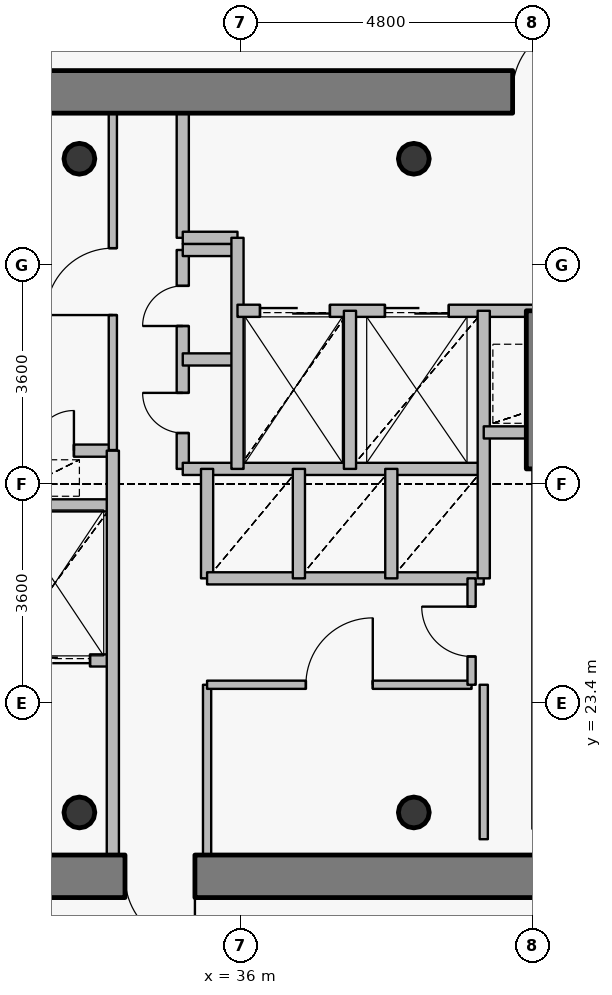
"""IFC4 building model, lengths in metres.
Left out: names, types, materials, properties, quantities, classifications, styles, units other than length and angle.
Written with IfcOpenShell. Run it as: python <this file> out.ifc"""

import sys

from ifc_helpers import new_model, si_unit, direction, frame, frame_2d, origin, origin_2d, place, context, subcontext, project, spatial, rectangle, hollow_circle, extrude, source, transform, mapped, element, fill, save


model = new_model("IFC4")
c1 = context("Model", 3, precision=1e-05, world=origin(), true_north=direction((0.0, 1.0)))
c2 = subcontext(c1, "Body", "Model", "MODEL_VIEW")
j1 = project(units=[si_unit("LENGTHUNIT", "METRE"), si_unit("PLANEANGLEUNIT", "RADIAN")], contexts=[c1])
p1 = place(None, origin())
s1 = spatial("IfcSite", under=j1, at=p1, CompositionType="ELEMENT")
p2 = place(p1, origin())
s2 = spatial("IfcBuilding", under=s1, at=p2, CompositionType="ELEMENT")
p3 = place(p2, frame((0.0, 0.0, 363.6)))
s3 = spatial("IfcBuildingStorey", under=s2, at=p3, CompositionType="ELEMENT", Elevation=363.6)
for number, where, z_axis, x_axis in (
    (1, (33.35, 21.6, 0.0), (0.0, 0.0, 1.0), (1.0, 0.0, 0.0)),
    (2, (38.85, 21.6, 0.0), (0.0, 0.0, 1.0), (1.0, 0.0, 0.0)),
    (3, (38.85, 32.35, 0.0), (0.0, 0.0, 1.0), (1.0, 0.0, 0.0)),
    (4, (33.35, 32.35, 0.0), (0.0, 0.0, 1.0), (1.0, 0.0, 0.0)),
):
    element("IfcColumn", number, at=place(p3, frame(where, z_axis=z_axis, x_axis=x_axis)), inside=s3, PredefinedType="COLUMN", context=c2, shape_type="SweptSolid", body=[
        extrude(hollow_circle(Radius=0.254, WallThickness=0.02, at=origin_2d()), origin(), (0.0, 0.0, 1.0), 4.8),
    ])
p4 = place(p3, frame((27.55, 33.45, 0.0), z_axis=(0.0, 0.0, 1.0), x_axis=(1.0, 0.0, 0.0)))
e5 = element("IfcWall", 5, at=p4, inside=s3, PredefinedType="SHEAR", context=c2, shape_type="SweptSolid", body=[
    extrude(rectangle(XDim=16.9, YDim=0.7, at=frame_2d((8.45, 0.0))), origin(), (0.0, 0.0, 1.0), 4.05),
])
p5 = place(p4, frame((12.925, 0.0, 0.0)))
e6 = element("IfcOpeningElement", 6, at=p5, cuts=e5, PredefinedType="OPENING", context=c2, shape_type="SweptSolid", body=[
    extrude(rectangle(XDim=1.15, YDim=2.15, at=origin_2d()), frame((0.575, 0.36, 1.075), z_axis=(0.0, -1.0, 0.0), x_axis=(1.0, 0.0, 0.0)), (0.0, 0.0, 1.0), 0.72),
])
p6 = place(p3, frame((44.45, 20.55, 0.0), z_axis=(0.0, 0.0, 1.0), x_axis=(-1.0, 0.0, 0.0)))
e7 = element("IfcWall", 7, at=p6, inside=s3, PredefinedType="SHEAR", context=c2, shape_type="SweptSolid", body=[
    extrude(rectangle(XDim=16.9, YDim=0.7, at=frame_2d((8.45, 0.0))), origin(), (0.0, 0.0, 1.0), 4.05),
])
p7 = place(p6, frame((13.075, 0.0, 0.0)))
e8 = element("IfcOpeningElement", 8, at=p7, cuts=e7, PredefinedType="OPENING", context=c2, shape_type="SweptSolid", body=[
    extrude(rectangle(XDim=1.15, YDim=2.15, at=origin_2d()), frame((0.575, 0.36, 1.075), z_axis=(0.0, -1.0, 0.0), x_axis=(1.0, 0.0, 0.0)), (0.0, 0.0, 1.0), 0.72),
])
p8 = place(p6, frame((9.2, 0.0, 0.0)))
e9 = element("IfcOpeningElement", 9, at=p8, cuts=e7, PredefinedType="OPENING", context=c2, shape_type="SweptSolid", body=[
    extrude(rectangle(XDim=1.15, YDim=2.15, at=origin_2d()), frame((0.575, 0.36, 1.075), z_axis=(0.0, -1.0, 0.0), x_axis=(1.0, 0.0, 0.0)), (0.0, 0.0, 1.0), 0.72),
])
p9 = place(p3, frame((40.9, 27.25, 0.0), z_axis=(0.0, 0.0, 1.0), x_axis=(0.0, 1.0, 0.0)))
e10 = element("IfcWall", 10, at=p9, inside=s3, PredefinedType="SHEAR", context=c2, shape_type="SweptSolid", body=[
    extrude(rectangle(XDim=2.6, YDim=0.4, at=frame_2d((1.3, 0.0))), origin(), (0.0, 0.0, 1.0), 4.1),
])
p10 = place(p3, frame((31.1, 27.55, 0.0), z_axis=(0.0, 0.0, 1.0), x_axis=(1.0, 0.0, 0.0)))
e11 = element("IfcWall", 11, at=p10, inside=s3, PredefinedType="PARTITIONING", context=c2, shape_type="SweptSolid", body=[
    extrude(rectangle(XDim=2.8, YDim=0.2, at=frame_2d((1.4, 0.0))), origin(), (0.0, 0.0, 1.0), 4.085),
])
p11 = place(p10, frame((1.5, 0.0, 0.0)))
e12 = element("IfcOpeningElement", 12, at=p11, cuts=e11, PredefinedType="OPENING", context=c2, shape_type="SweptSolid", body=[
    extrude(rectangle(XDim=0.66, YDim=2.05, at=origin_2d()), frame((0.33, 0.11, 1.025), z_axis=(0.0, -1.0, 0.0), x_axis=(1.0, 0.0, 0.0)), (0.0, 0.0, 1.0), 0.22),
])
p12 = place(p3, frame((32.0, 24.1, 0.0), z_axis=(0.0, 0.0, 1.0), x_axis=(1.0, 0.0, 0.0)))
e13 = element("IfcWall", 13, at=p12, inside=s3, PredefinedType="PARTITIONING", context=c2, shape_type="SweptSolid", body=[
    extrude(rectangle(XDim=1.9, YDim=0.2, at=frame_2d((0.95, 0.0))), origin(), (0.0, 0.0, 1.0), 4.085),
])
p13 = place(p12, frame((0.375, 0.0, 0.0)))
e14 = element("IfcOpeningElement", 14, at=p13, cuts=e13, PredefinedType="OPENING", context=c2, shape_type="SweptSolid", body=[
    extrude(rectangle(XDim=1.15, YDim=2.15, at=origin_2d()), frame((0.575, 0.11, 1.075), z_axis=(0.0, -1.0, 0.0), x_axis=(1.0, 0.0, 0.0)), (0.0, 0.0, 1.0), 0.22),
])
p14 = place(p3, frame((32.0, 26.65, 0.0), z_axis=(0.0, 0.0, 1.0), x_axis=(1.0, 0.0, 0.0)))
e15 = element("IfcWall", 15, at=p14, inside=s3, PredefinedType="PARTITIONING", context=c2, shape_type="SweptSolid", body=[
    extrude(rectangle(XDim=1.9, YDim=0.2, at=frame_2d((0.95, 0.0))), origin(), (0.0, 0.0, 1.0), 4.085),
])
p15 = place(p3, frame((33.9, 20.9, 0.0), z_axis=(0.0, 0.0, 1.0), x_axis=(0.0, 1.0, 0.0)))
e16 = element("IfcWall", 16, at=p15, inside=s3, PredefinedType="PARTITIONING", context=c2, shape_type="SweptSolid", body=[
    extrude(rectangle(XDim=6.65, YDim=0.2, at=frame_2d((3.325, 0.0))), origin(), (0.0, 0.0, 1.0), 4.085),
])
p16 = place(p3, frame((33.9, 27.56, 0.0), z_axis=(0.0, 0.0, 1.0), x_axis=(0.0, 1.0, 0.0)))
e17 = element("IfcWall", 17, at=p16, inside=s3, PredefinedType="PARTITIONING", context=c2, shape_type="SweptSolid", body=[
    extrude(rectangle(XDim=5.54, YDim=0.135, at=frame_2d((2.77, 0.0))), origin(), (0.0, 0.0, 1.0), 4.085),
])
p17 = place(p16, frame((2.22, 0.0, 0.0)))
e18 = element("IfcOpeningElement", 18, at=p17, cuts=e17, PredefinedType="OPENING", context=c2, shape_type="SweptSolid", body=[
    extrude(rectangle(XDim=1.1, YDim=2.15, at=origin_2d()), frame((0.55, 0.078, 1.075), z_axis=(0.0, -1.0, 0.0), x_axis=(1.0, 0.0, 0.0)), (0.0, 0.0, 1.0), 0.155),
])
p18 = place(p3, frame((35.05, 27.25, 0.0), z_axis=(0.0, 0.0, 1.0), x_axis=(0.0, 1.0, 0.0)))
e19 = element("IfcWall", 19, at=p18, inside=s3, PredefinedType="PARTITIONING", context=c2, shape_type="SweptSolid", body=[
    extrude(rectangle(XDim=3.6, YDim=0.2, at=frame_2d((1.8, 0.0))), origin(), (0.0, 0.0, 1.0), 4.5),
])
p19 = place(p18, frame((0.59, 0.0, 0.0)))
e20 = element("IfcOpeningElement", 20, at=p19, cuts=e19, PredefinedType="OPENING", context=c2, shape_type="SweptSolid", body=[
    extrude(rectangle(XDim=0.66, YDim=2.05, at=origin_2d()), frame((0.33, 0.11, 1.025), z_axis=(0.0, -1.0, 0.0), x_axis=(1.0, 0.0, 0.0)), (0.0, 0.0, 1.0), 0.22),
])
p20 = place(p18, frame((2.35, 0.0, 0.0)))
e21 = element("IfcOpeningElement", 21, at=p20, cuts=e19, PredefinedType="OPENING", context=c2, shape_type="SweptSolid", body=[
    extrude(rectangle(XDim=0.66, YDim=2.05, at=origin_2d()), frame((0.33, 0.11, 1.025), z_axis=(0.0, -1.0, 0.0), x_axis=(1.0, 0.0, 0.0)), (0.0, 0.0, 1.0), 0.22),
])
p21 = place(p3, frame((35.05, 27.25, 0.0), z_axis=(0.0, 0.0, 1.0), x_axis=(1.0, 0.0, 0.0)))
e22 = element("IfcWall", 22, at=p21, inside=s3, PredefinedType="PARTITIONING", context=c2, shape_type="SweptSolid", body=[
    extrude(rectangle(XDim=4.95, YDim=0.2, at=frame_2d((2.475, 0.0))), origin(), (0.0, 0.0, 1.0), 4.085),
])
for number, where, z_axis, x_axis in (
    (23, (35.05, 29.05, 0.0), (0.0, 0.0, 1.0), (1.0, 0.0, 0.0)),
    (24, (35.05, 30.85, 0.0), (0.0, 0.0, 1.0), (1.0, 0.0, 0.0)),
):
    element("IfcWall", number, at=place(p3, frame(where, z_axis=z_axis, x_axis=x_axis)), inside=s3, PredefinedType="PARTITIONING", context=c2, shape_type="SweptSolid", body=[
        extrude(rectangle(XDim=0.9, YDim=0.2, at=frame_2d((0.45, 0.0))), origin(), (0.0, 0.0, 1.0), 4.5),
    ])
p22 = place(p3, frame((35.05, 31.05, 0.0), z_axis=(0.0, 0.0, 1.0), x_axis=(0.0, 1.0, 0.0)))
e25 = element("IfcWall", 25, at=p22, inside=s3, PredefinedType="PARTITIONING", context=c2, shape_type="SweptSolid", body=[
    extrude(rectangle(XDim=2.05, YDim=0.2, at=frame_2d((1.025, 0.0))), origin(), (0.0, 0.0, 1.0), 4.085),
])
p23 = place(p3, frame((35.05, 31.05, 0.0), z_axis=(0.0, 0.0, 1.0), x_axis=(1.0, 0.0, 0.0)))
e26 = element("IfcWall", 26, at=p23, inside=s3, PredefinedType="PARTITIONING", context=c2, shape_type="SweptSolid", body=[
    extrude(rectangle(XDim=0.9, YDim=0.2, at=frame_2d((0.45, 0.0))), origin(), (0.0, 0.0, 1.0), 4.5),
])
p24 = place(p3, frame((35.45, 20.9, 0.0), z_axis=(0.0, 0.0, 1.0), x_axis=(0.0, 1.0, 0.0)))
e27 = element("IfcWall", 27, at=p24, inside=s3, PredefinedType="PARTITIONING", context=c2, shape_type="SweptSolid", body=[
    extrude(rectangle(XDim=2.8, YDim=0.135, at=frame_2d((1.4, 0.0))), origin(), (0.0, 0.0, 1.0), 4.085),
])
p25 = place(p3, frame((35.45, 23.7, 0.0), z_axis=(0.0, 0.0, 1.0), x_axis=(1.0, 0.0, 0.0)))
e28 = element("IfcWall", 28, at=p25, inside=s3, PredefinedType="PARTITIONING", context=c2, shape_type="SweptSolid", body=[
    extrude(rectangle(XDim=4.35, YDim=0.135, at=frame_2d((2.175, 0.0))), origin(), (0.0, 0.0, 1.0), 4.085),
])
p26 = place(p25, frame((1.625, 0.0, 0.0)))
e29 = element("IfcOpeningElement", 29, at=p26, cuts=e28, PredefinedType="OPENING", context=c2, shape_type="SweptSolid", body=[
    extrude(rectangle(XDim=1.1, YDim=2.15, at=origin_2d()), frame((0.55, 0.078, 1.075), z_axis=(0.0, -1.0, 0.0), x_axis=(1.0, 0.0, 0.0)), (0.0, 0.0, 1.0), 0.155),
])
p27 = place(p3, frame((35.45, 25.45, 0.0), z_axis=(0.0, 0.0, 1.0), x_axis=(0.0, 1.0, 0.0)))
e30 = element("IfcWall", 30, at=p27, inside=s3, PredefinedType="PARTITIONING", context=c2, shape_type="SweptSolid", body=[
    extrude(rectangle(XDim=1.8, YDim=0.2, at=frame_2d((0.9, 0.0))), origin(), (0.0, 0.0, 1.0), 4.5),
])
p28 = place(p3, frame((35.45, 25.45, 0.0), z_axis=(0.0, 0.0, 1.0), x_axis=(1.0, 0.0, 0.0)))
e31 = element("IfcWall", 31, at=p28, inside=s3, PredefinedType="PARTITIONING", context=c2, shape_type="SweptSolid", body=[
    extrude(rectangle(XDim=4.55, YDim=0.2, at=frame_2d((2.275, 0.0))), origin(), (0.0, 0.0, 1.0), 4.085),
])
p29 = place(p3, frame((35.95, 27.25, 0.0), z_axis=(0.0, 0.0, 1.0), x_axis=(0.0, 1.0, 0.0)))
e32 = element("IfcWall", 32, at=p29, inside=s3, PredefinedType="PARTITIONING", context=c2, shape_type="SweptSolid", body=[
    extrude(rectangle(XDim=3.8, YDim=0.2, at=frame_2d((1.9, 0.0))), origin(), (0.0, 0.0, 1.0), 4.5),
])
p30 = place(p3, frame((35.95, 29.85, 0.0), z_axis=(0.0, 0.0, 1.0), x_axis=(1.0, 0.0, 0.0)))
e33 = element("IfcWall", 33, at=p30, inside=s3, PredefinedType="PARTITIONING", context=c2, shape_type="SweptSolid", body=[
    extrude(rectangle(XDim=8.49, YDim=0.2, at=frame_2d((4.245, 0.0))), origin(), (0.0, 0.0, 1.0), 4.085),
])
p31 = place(p30, frame((6.1, 0.0, 0.0)))
e34 = element("IfcOpeningElement", 34, at=p31, cuts=e33, PredefinedType="OPENING", context=c2, shape_type="SweptSolid", body=[
    extrude(rectangle(XDim=1.2, YDim=2.15, at=origin_2d()), frame((0.6, 0.11, 1.075), z_axis=(0.0, -1.0, 0.0), x_axis=(1.0, 0.0, 0.0)), (0.0, 0.0, 1.0), 0.22),
])
p32 = place(p30, frame((0.37, 0.0, 0.0)))
e35 = element("IfcOpeningElement", 35, at=p32, cuts=e33, PredefinedType="OPENING", context=c2, shape_type="SweptSolid", body=[
    extrude(rectangle(XDim=1.15, YDim=2.15, at=origin_2d()), frame((0.575, 0.11, 1.075), z_axis=(0.0, -1.0, 0.0), x_axis=(1.0, 0.0, 0.0)), (0.0, 0.0, 1.0), 0.22),
])
p33 = place(p30, frame((2.425, 0.0, 0.0)))
e36 = element("IfcOpeningElement", 36, at=p33, cuts=e33, PredefinedType="OPENING", context=c2, shape_type="SweptSolid", body=[
    extrude(rectangle(XDim=1.05, YDim=2.15, at=origin_2d()), frame((0.525, 0.11, 1.075), z_axis=(0.0, -1.0, 0.0), x_axis=(1.0, 0.0, 0.0)), (0.0, 0.0, 1.0), 0.22),
])
p34 = place(p3, frame((36.96, 25.45, 0.0), z_axis=(0.0, 0.0, 1.0), x_axis=(0.0, 1.0, 0.0)))
e37 = element("IfcWall", 37, at=p34, inside=s3, PredefinedType="PARTITIONING", context=c2, shape_type="SweptSolid", body=[
    extrude(rectangle(XDim=1.8, YDim=0.2, at=frame_2d((0.9, 0.0))), origin(), (0.0, 0.0, 1.0), 4.5),
])
p35 = place(p3, frame((37.8, 27.25, 0.0), z_axis=(0.0, 0.0, 1.0), x_axis=(0.0, 1.0, 0.0)))
e38 = element("IfcWall", 38, at=p35, inside=s3, PredefinedType="PARTITIONING", context=c2, shape_type="SweptSolid", body=[
    extrude(rectangle(XDim=2.6, YDim=0.2, at=frame_2d((1.3, 0.0))), origin(), (0.0, 0.0, 1.0), 4.5),
])
p36 = place(p3, frame((38.48, 25.45, 0.0), z_axis=(0.0, 0.0, 1.0), x_axis=(0.0, 1.0, 0.0)))
e39 = element("IfcWall", 39, at=p36, inside=s3, PredefinedType="PARTITIONING", context=c2, shape_type="SweptSolid", body=[
    extrude(rectangle(XDim=1.8, YDim=0.2, at=frame_2d((0.9, 0.0))), origin(), (0.0, 0.0, 1.0), 4.5),
])
p37 = place(p3, frame((39.8, 23.7, 0.0), z_axis=(0.0, 0.0, 1.0), x_axis=(0.0, 1.0, 0.0)))
e40 = element("IfcWall", 40, at=p37, inside=s3, PredefinedType="PARTITIONING", context=c2, shape_type="SweptSolid", body=[
    extrude(rectangle(XDim=1.75, YDim=0.135, at=frame_2d((0.875, 0.0))), origin(), (0.0, 0.0, 1.0), 4.5),
])
p38 = place(p37, frame((0.465, 0.0, 0.0)))
e41 = element("IfcOpeningElement", 41, at=p38, cuts=e40, PredefinedType="OPENING", context=c2, shape_type="SweptSolid", body=[
    extrude(rectangle(XDim=0.82, YDim=2.1, at=origin_2d()), frame((0.41, 0.078, 1.05), z_axis=(0.0, -1.0, 0.0), x_axis=(1.0, 0.0, 0.0)), (0.0, 0.0, 1.0), 0.155),
])
p39 = place(p3, frame((40.0, 25.45, 0.0), z_axis=(0.0, 0.0, 1.0), x_axis=(0.0, 1.0, 0.0)))
e42 = element("IfcWall", 42, at=p39, inside=s3, PredefinedType="PARTITIONING", context=c2, shape_type="SweptSolid", body=[
    extrude(rectangle(XDim=4.4, YDim=0.2, at=frame_2d((2.2, 0.0))), origin(), (0.0, 0.0, 1.0), 4.5),
])
p40 = place(p3, frame((40.0, 27.85, 0.0), z_axis=(0.0, 0.0, 1.0), x_axis=(1.0, 0.0, 0.0)))
e43 = element("IfcWall", 43, at=p40, inside=s3, PredefinedType="PARTITIONING", context=c2, shape_type="SweptSolid", body=[
    extrude(rectangle(XDim=0.9, YDim=0.2, at=frame_2d((0.45, 0.0))), origin(), (0.0, 0.0, 1.0), 4.5),
])
p41 = place(p3, frame((40.9, 21.33, 0.0), z_axis=(0.0, 0.0, 1.0), x_axis=(0.0, 1.0, 0.0)))
e44 = element("IfcWall", 44, at=p41, inside=s3, PredefinedType="PARTITIONING", context=c2, shape_type="SweptSolid", body=[
    extrude(rectangle(XDim=5.91, YDim=0.2, at=frame_2d((2.955, 0.0))), origin(), (0.0, 0.0, 1.0), 4.035),
])
p42 = place(p3, frame((40.0, 23.7, 0.0), z_axis=(0.0, 0.0, 1.0), x_axis=(0.0, -1.0, 0.0)))
e45 = element("IfcWall", 45, at=p42, inside=s3, PredefinedType="PARTITIONING", context=c2, shape_type="SweptSolid", body=[
    extrude(rectangle(XDim=2.54, YDim=0.135, at=frame_2d((1.27, 0.0))), origin(), (0.0, 0.0, 1.0), 4.035),
])
m1 = source(origin(), c2, "Body", "SweptSolid", [
    extrude(rectangle(XDim=1.15, YDim=2.15, at=origin_2d()), frame((0.575, 0.025, 1.075), z_axis=(0.0, -1.0, 0.0), x_axis=(1.0, 0.0, 0.0)), (0.0, 0.0, 1.0), 0.05),
])
p43 = place(p5, origin())
e46 = element("IfcDoor", 46, at=p43, inside=s3, OperationType="SINGLE_SWING_RIGHT", PredefinedType="DOOR", context=c2, shape_type="MappedRepresentation", body=[
    mapped(m1, transform((0.0, 0.0, 0.0), x_axis=(1.0, 0.0, 0.0), y_axis=(0.0, 1.0, 0.0), z_axis=(0.0, 0.0, 1.0), scale=1.0)),
])
fill(e6, e46)
p44 = place(p8, origin())
e47 = element("IfcDoor", 47, at=p44, inside=s3, OperationType="SINGLE_SWING_LEFT", PredefinedType="DOOR", context=c2, shape_type="MappedRepresentation", body=[
    mapped(m1, transform((0.0, 0.0, 0.0), x_axis=(1.0, 0.0, 0.0), y_axis=(0.0, 1.0, 0.0), z_axis=(0.0, 0.0, 1.0), scale=1.0)),
])
fill(e9, e47)
m2 = source(origin(), c2, "Body", "SweptSolid", [
    extrude(rectangle(XDim=1.15, YDim=2.15, at=origin_2d()), frame((0.575, 0.025, 1.075), z_axis=(0.0, -1.0, 0.0), x_axis=(1.0, 0.0, 0.0)), (0.0, 0.0, 1.0), 0.05),
])
p45 = place(p32, origin())
e48 = element("IfcDoor", 48, at=p45, inside=s3, OperationType="DOUBLE_DOOR_SLIDING", PredefinedType="USERDEFINED", context=c2, shape_type="MappedRepresentation", body=[
    mapped(m2, transform((0.0, 0.0, 0.0), x_axis=(1.0, 0.0, 0.0), y_axis=(0.0, 1.0, 0.0), z_axis=(0.0, 0.0, 1.0), scale=1.0)),
])
fill(e35, e48)
p46 = place(p13, origin())
e49 = element("IfcDoor", 49, at=p46, inside=s3, OperationType="DOUBLE_DOOR_SLIDING", PredefinedType="USERDEFINED", context=c2, shape_type="MappedRepresentation", body=[
    mapped(m2, transform((0.0, 0.0, 0.0), x_axis=(1.0, 0.0, 0.0), y_axis=(0.0, 1.0, 0.0), z_axis=(0.0, 0.0, 1.0), scale=1.0)),
])
fill(e14, e49)
m3 = source(origin(), c2, "Body", "SweptSolid", [
    extrude(rectangle(XDim=1.05, YDim=2.15, at=origin_2d()), frame((0.525, 0.025, 1.075), z_axis=(0.0, -1.0, 0.0), x_axis=(1.0, 0.0, 0.0)), (0.0, 0.0, 1.0), 0.05),
])
p47 = place(p33, origin())
e50 = element("IfcDoor", 50, at=p47, inside=s3, OperationType="DOUBLE_DOOR_SLIDING", PredefinedType="USERDEFINED", context=c2, shape_type="MappedRepresentation", body=[
    mapped(m3, transform((0.0, 0.0, 0.0), x_axis=(1.0, 0.0, 0.0), y_axis=(0.0, 1.0, 0.0), z_axis=(0.0, 0.0, 1.0), scale=1.0)),
])
fill(e36, e50)
m4 = source(origin(), c2, "Body", "SweptSolid", [
    extrude(rectangle(XDim=0.66, YDim=2.05, at=origin_2d()), frame((0.33, 0.025, 1.025), z_axis=(0.0, -1.0, 0.0), x_axis=(1.0, 0.0, 0.0)), (0.0, 0.0, 1.0), 0.05),
])
p48 = place(p19, origin())
e51 = element("IfcDoor", 51, at=p48, inside=s3, OperationType="SINGLE_SWING_RIGHT", PredefinedType="USERDEFINED", context=c2, shape_type="MappedRepresentation", body=[
    mapped(m4, transform((0.0, 0.0, 0.0), x_axis=(1.0, 0.0, 0.0), y_axis=(0.0, 1.0, 0.0), z_axis=(0.0, 0.0, 1.0), scale=1.0)),
])
fill(e20, e51)
p49 = place(p20, origin())
e52 = element("IfcDoor", 52, at=p49, inside=s3, OperationType="SINGLE_SWING_LEFT", PredefinedType="USERDEFINED", context=c2, shape_type="MappedRepresentation", body=[
    mapped(m4, transform((0.0, 0.0, 0.0), x_axis=(1.0, 0.0, 0.0), y_axis=(0.0, 1.0, 0.0), z_axis=(0.0, 0.0, 1.0), scale=1.0)),
])
fill(e21, e52)
m5 = source(origin(), c2, "Body", "SweptSolid", [
    extrude(rectangle(XDim=1.1, YDim=2.15, at=origin_2d()), frame((0.55, 0.025, 1.075), z_axis=(0.0, -1.0, 0.0), x_axis=(1.0, 0.0, 0.0)), (0.0, 0.0, 1.0), 0.05),
])
p50 = place(p26, origin())
e53 = element("IfcDoor", 53, at=p50, inside=s3, OperationType="SINGLE_SWING_RIGHT", PredefinedType="DOOR", context=c2, shape_type="MappedRepresentation", body=[
    mapped(m5, transform((0.0, 0.0, 0.0), x_axis=(1.0, 0.0, 0.0), y_axis=(0.0, 1.0, 0.0), z_axis=(0.0, 0.0, 1.0), scale=1.0)),
])
fill(e29, e53)
p51 = place(p17, origin())
e54 = element("IfcDoor", 54, at=p51, inside=s3, OperationType="SINGLE_SWING_LEFT", PredefinedType="DOOR", context=c2, shape_type="MappedRepresentation", body=[
    mapped(m5, transform((0.0, 0.0, 0.0), x_axis=(1.0, 0.0, 0.0), y_axis=(0.0, 1.0, 0.0), z_axis=(0.0, 0.0, 1.0), scale=1.0)),
])
fill(e18, e54)
m6 = source(origin(), c2, "Body", "SweptSolid", [
    extrude(rectangle(XDim=0.82, YDim=2.1, at=origin_2d()), frame((0.41, 0.025, 1.05), z_axis=(0.0, -1.0, 0.0), x_axis=(1.0, 0.0, 0.0)), (0.0, 0.0, 1.0), 0.05),
])
p52 = place(p38, origin())
e55 = element("IfcDoor", 55, at=p52, inside=s3, OperationType="SINGLE_SWING_RIGHT", PredefinedType="DOOR", context=c2, shape_type="MappedRepresentation", body=[
    mapped(m6, transform((0.0, 0.0, 0.0), x_axis=(1.0, 0.0, 0.0), y_axis=(0.0, 1.0, 0.0), z_axis=(0.0, 0.0, 1.0), scale=1.0)),
])
fill(e41, e55)
p53 = place(p11, origin())
e56 = element("IfcDoor", 56, at=p53, inside=s3, OperationType="SINGLE_SWING_RIGHT", PredefinedType="USERDEFINED", context=c2, shape_type="MappedRepresentation", body=[
    mapped(m4, transform((0.0, 0.0, 0.0), x_axis=(1.0, 0.0, 0.0), y_axis=(0.0, 1.0, 0.0), z_axis=(0.0, 0.0, 1.0), scale=1.0)),
])
fill(e12, e56)
save(model, sys.argv[1])
